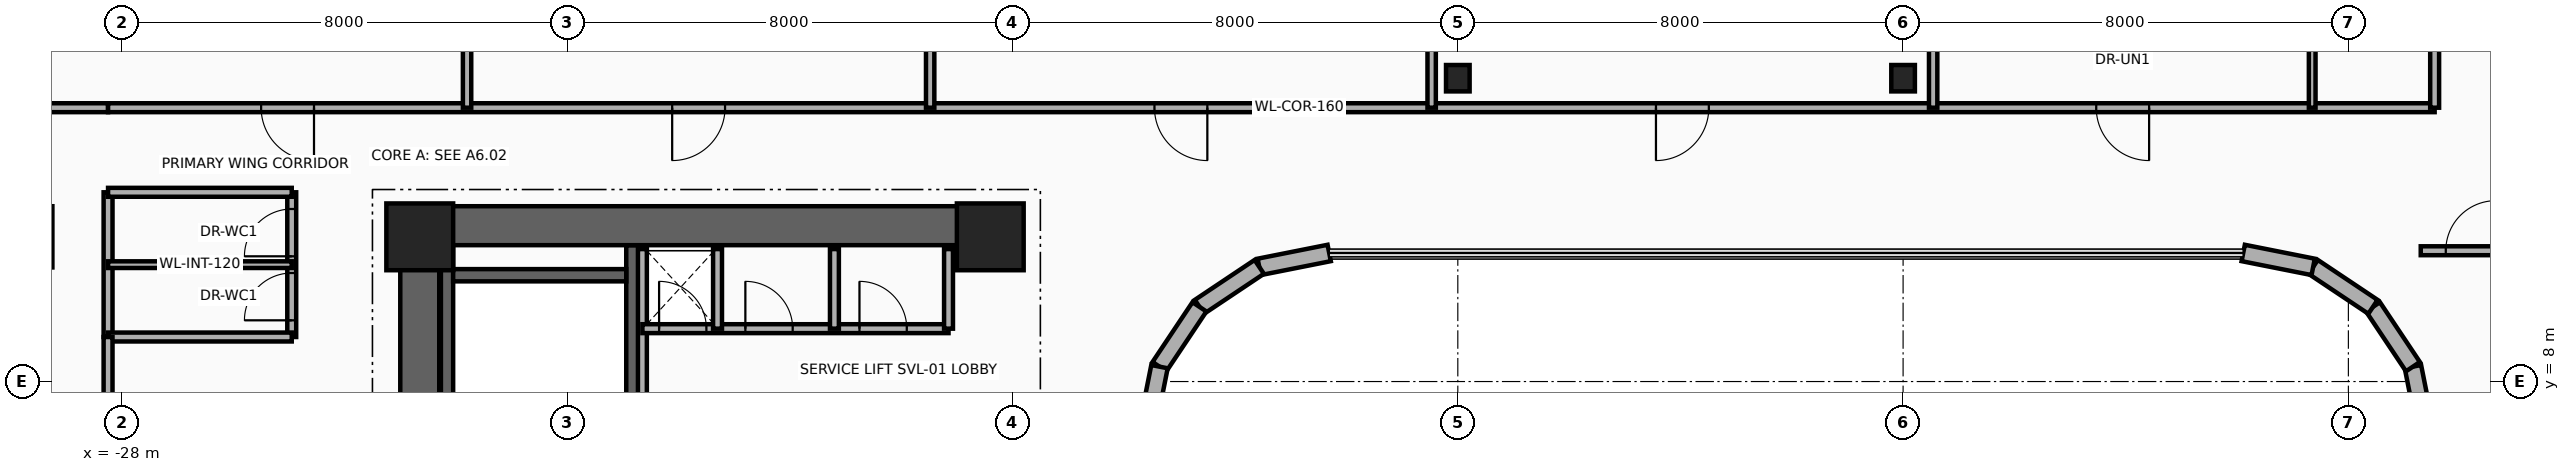
"""IFC4 building model, lengths in metres.
Left out: names, types, materials, properties, quantities, classifications, styles, units other than length and angle.
Written with IfcOpenShell. Run it as: python <this file> out.ifc"""

import sys

from ifc_helpers import new_model, si_unit, direction, frame, frame_2d, origin, origin_2d, place, context, subcontext, project, spatial, rectangle, i_section, extrude, source, transform, mapped, element, fill, save


model = new_model("IFC4")
c1 = context("Model", 3, precision=1e-05, world=origin(), true_north=direction((0.0, 1.0)))
c2 = subcontext(c1, "Body", "Model", "MODEL_VIEW")
j1 = project(units=[si_unit("LENGTHUNIT", "METRE"), si_unit("PLANEANGLEUNIT", "RADIAN")], contexts=[c1])
p1 = place(None, origin())
s1 = spatial("IfcSite", under=j1, at=p1, CompositionType="ELEMENT")
p2 = place(p1, origin())
s2 = spatial("IfcBuilding", under=s1, at=p2, CompositionType="ELEMENT")
p3 = place(p2, frame((0.0, 0.0, 116.8)))
s3 = spatial("IfcBuildingStorey", under=s2, at=p3, CompositionType="ELEMENT", Elevation=116.8)
for number, where, z_axis, x_axis in (
    (1, (-22.16, 1.78, 0.0), (0.0, 0.0, 1.0), (0.0, 1.0, 0.0)),
    (2, (-18.83, 1.78, 0.0), (0.0, 0.0, 1.0), (0.0, 1.0, 0.0)),
):
    element("IfcWall", number, at=place(p3, frame(where, z_axis=z_axis, x_axis=x_axis)), inside=s3, PredefinedType="SHEAR", context=c2, shape_type="SweptSolid", body=[
        extrude(rectangle(XDim=8.67, YDim=0.22, at=frame_2d((4.335, 0.0))), origin(), (0.0, 0.0, 1.0), 3.46),
    ])
p4 = place(p3, frame((-22.05, 9.91, 0.0), z_axis=(0.0, 0.0, 1.0), x_axis=(1.0, 0.0, 0.0)))
e3 = element("IfcWall", 3, at=p4, inside=s3, PredefinedType="SHEAR", context=c2, shape_type="SweptSolid", body=[
    extrude(rectangle(XDim=3.11, YDim=0.22, at=frame_2d((1.555, 0.0))), origin(), (0.0, 0.0, 1.0), 3.46),
])
p5 = place(p3, frame((-22.65, -11.15, 0.0), z_axis=(0.0, 0.0, 1.0), x_axis=(0.0, 1.0, 0.0)))
e4 = element("IfcWall", 4, at=p5, inside=s3, PredefinedType="SHEAR", context=c2, shape_type="SweptSolid", body=[
    extrude(rectangle(XDim=22.3, YDim=0.7, at=frame_2d((11.15, 0.0))), origin(), (0.0, 0.0, 1.0), 3.46),
])
p6 = place(p3, frame((-22.65, 10.8, 0.0), z_axis=(0.0, 0.0, 1.0), x_axis=(1.0, 0.0, 0.0)))
e5 = element("IfcWall", 5, at=p6, inside=s3, PredefinedType="SHEAR", context=c2, shape_type="SweptSolid", body=[
    extrude(rectangle(XDim=10.25, YDim=0.7, at=frame_2d((5.125, 0.0))), origin(), (0.0, 0.0, 1.0), 3.46),
])
m1 = source(origin(), c2, "Body", "SweptSolid", [
    extrude(rectangle(XDim=1.2, YDim=1.2, at=origin_2d()), origin(), (0.0, 0.0, 1.0), 3.7),
])
for number, where, z_axis, x_axis in (
    (6, (-22.65, 10.6, 0.0), (0.0, 0.0, 1.0), (1.0, 0.0, 0.0)),
    (7, (-12.4, 10.6, 0.0), (0.0, 0.0, 1.0), (1.0, 0.0, 0.0)),
):
    element("IfcColumn", number, at=place(p3, frame(where, z_axis=z_axis, x_axis=x_axis)), inside=s3, PredefinedType="COLUMN", context=c2, shape_type="MappedRepresentation", body=[
        mapped(m1, transform((0.0, 0.0, 0.0), x_axis=(1.0, 0.0, 0.0), y_axis=(0.0, 1.0, 0.0), z_axis=(0.0, 0.0, 1.0), scale=1.0)),
    ])
m2 = source(origin(), c2, "Body", "SweptSolid", [
    extrude(i_section(OverallWidth=0.424, OverallDepth=0.474, WebThickness=0.048, FlangeThickness=0.077, at=origin_2d()), origin(), (0.0, 0.0, 1.0), 3.7),
])
for number, where, z_axis, x_axis in (
    (8, (-4.0, 13.45, 0.0), (0.0, 0.0, 1.0), (1.0, 0.0, 0.0)),
    (9, (4.0, 13.45, 0.0), (0.0, 0.0, 1.0), (1.0, 0.0, 0.0)),
):
    element("IfcColumn", number, at=place(p3, frame(where, z_axis=z_axis, x_axis=x_axis)), inside=s3, PredefinedType="COLUMN", context=c2, shape_type="MappedRepresentation", body=[
        mapped(m2, transform((0.0, 0.0, 0.0), x_axis=(1.0, 0.0, 0.0), y_axis=(0.0, 1.0, 0.0), z_axis=(0.0, 0.0, 1.0), scale=1.0)),
    ])
p7 = place(p3, frame((13.41, 7.011, 0.0), z_axis=(0.0, 0.0, 1.0), x_axis=(-0.195090163074, 0.980785312019, 0.0)))
e10 = element("IfcWall", 10, at=p7, inside=s3, PredefinedType="SOLIDWALL", context=c2, shape_type="SweptSolid", body=[
    extrude(rectangle(XDim=1.281, YDim=0.3, at=frame_2d((0.641, 0.0))), origin(), (0.0, 0.0, 1.0), 3.46),
])
for number, where, z_axis, x_axis in (
    (11, (13.16, 8.268, 0.0), (0.0, 0.0, 1.0), (-0.556, 0.831, 0.0)),
    (12, (12.442, 9.342, 0.0), (0.0, 0.0, 1.0), (-0.831, 0.556, 0.0)),
):
    element("IfcWall", number, at=place(p3, frame(where, z_axis=z_axis, x_axis=x_axis)), inside=s3, PredefinedType="SOLIDWALL", context=c2, shape_type="SweptSolid", body=[
        extrude(rectangle(XDim=1.292, YDim=0.3, at=frame_2d((0.646, 0.0))), origin(), (0.0, 0.0, 1.0), 3.46),
    ])
for number, where, z_axis, x_axis in (
    (13, (11.367, 10.06, 0.0), (0.0, 0.0, 1.0), (-0.981, 0.195, 0.0)),
    (14, (-6.311, 10.31, 0.0), (0.0, 0.0, 1.0), (-0.981, -0.195, 0.0)),
):
    element("IfcWall", number, at=place(p3, frame(where, z_axis=z_axis, x_axis=x_axis)), inside=s3, PredefinedType="SOLIDWALL", context=c2, shape_type="SweptSolid", body=[
        extrude(rectangle(XDim=1.281, YDim=0.3, at=frame_2d((0.641, 0.0))), origin(), (0.0, 0.0, 1.0), 3.46),
    ])
p8 = place(p3, frame((-7.567, 10.06, 0.0), z_axis=(0.0, 0.0, 1.0), x_axis=(-0.831497739511, -0.555528135371, 0.0)))
e15 = element("IfcWall", 15, at=p8, inside=s3, PredefinedType="SOLIDWALL", context=c2, shape_type="SweptSolid", body=[
    extrude(rectangle(XDim=1.292, YDim=0.3, at=frame_2d((0.646, 0.0))), origin(), (0.0, 0.0, 1.0), 3.46),
])
p9 = place(p3, frame((-8.642, 9.342, 0.0), z_axis=(0.0, 0.0, 1.0), x_axis=(-0.555615398575, -0.831439431869, 0.0)))
e16 = element("IfcWall", 16, at=p9, inside=s3, PredefinedType="SOLIDWALL", context=c2, shape_type="SweptSolid", body=[
    extrude(rectangle(XDim=1.292, YDim=0.3, at=frame_2d((0.646, 0.0))), origin(), (0.0, 0.0, 1.0), 3.46),
])
p10 = place(p3, frame((-9.36, 8.268, 0.0), z_axis=(0.0, 0.0, 1.0), x_axis=(-0.195090163074, -0.980785312019, 0.0)))
e17 = element("IfcWall", 17, at=p10, inside=s3, PredefinedType="SOLIDWALL", context=c2, shape_type="SweptSolid", body=[
    extrude(rectangle(XDim=1.281, YDim=0.3, at=frame_2d((0.641, 0.0))), origin(), (0.0, 0.0, 1.0), 3.46),
])
p11 = place(p3, frame((-18.65, 7.45, 0.0), z_axis=(0.0, 0.0, 1.0), x_axis=(0.0, 1.0, 0.0)))
e18 = element("IfcWall", 18, at=p11, inside=s3, PredefinedType="PARTITIONING", context=c2, shape_type="SweptSolid", body=[
    extrude(rectangle(XDim=2.93, YDim=0.16, at=frame_2d((1.465, 0.0))), origin(), (0.0, 0.0, 1.0), 3.46),
])
p12 = place(p3, frame((-18.65, 8.95, 0.0), z_axis=(0.0, 0.0, 1.0), x_axis=(1.0, 0.0, 0.0)))
e19 = element("IfcWall", 19, at=p12, inside=s3, PredefinedType="PARTITIONING", context=c2, shape_type="SweptSolid", body=[
    extrude(rectangle(XDim=5.5, YDim=0.16, at=frame_2d((2.75, 0.0))), origin(), (0.0, 0.0, 1.0), 3.46),
])
p13 = place(p12, frame((0.3, 0.0, 0.0)))
e20 = element("IfcOpeningElement", 20, at=p13, cuts=e19, PredefinedType="OPENING", context=c2, shape_type="SweptSolid", body=[
    extrude(rectangle(XDim=0.85, YDim=2.05, at=frame_2d((0.425, 1.025))), frame((0.0, 0.095, 0.0), z_axis=(0.0, -1.0, 0.0), x_axis=(1.0, 0.0, 0.0)), (0.0, 0.0, 1.0), 0.19),
])
p14 = place(p12, frame((1.85, 0.0, 0.0)))
e21 = element("IfcOpeningElement", 21, at=p14, cuts=e19, PredefinedType="OPENING", context=c2, shape_type="SweptSolid", body=[
    extrude(rectangle(XDim=0.85, YDim=2.05, at=frame_2d((0.425, 1.025))), frame((0.0, 0.095, 0.0), z_axis=(0.0, -1.0, 0.0), x_axis=(1.0, 0.0, 0.0)), (0.0, 0.0, 1.0), 0.19),
])
p15 = place(p12, frame((3.9, 0.0, 0.0)))
e22 = element("IfcOpeningElement", 22, at=p15, cuts=e19, PredefinedType="OPENING", context=c2, shape_type="SweptSolid", body=[
    extrude(rectangle(XDim=0.85, YDim=2.05, at=frame_2d((0.425, 1.025))), frame((0.0, 0.095, 0.0), z_axis=(0.0, -1.0, 0.0), x_axis=(1.0, 0.0, 0.0)), (0.0, 0.0, 1.0), 0.19),
])
for number, where, z_axis, x_axis in (
    (23, (-13.15, 8.95, 0.0), (0.0, 0.0, 1.0), (0.0, 1.0, 0.0)),
    (24, (-17.3, 8.95, 0.0), (0.0, 0.0, 1.0), (0.0, 1.0, 0.0)),
    (25, (-15.2, 8.95, 0.0), (0.0, 0.0, 1.0), (0.0, 1.0, 0.0)),
):
    element("IfcWall", number, at=place(p3, frame(where, z_axis=z_axis, x_axis=x_axis)), inside=s3, PredefinedType="PARTITIONING", context=c2, shape_type="SweptSolid", body=[
        extrude(rectangle(XDim=1.43, YDim=0.16, at=frame_2d((0.715, 0.0))), origin(), (0.0, 0.0, 1.0), 3.46),
    ])
p16 = place(p3, frame((-28.25, 8.8, 0.0), z_axis=(0.0, 0.0, 1.0), x_axis=(0.0, 1.0, 0.0)))
e26 = element("IfcWall", 26, at=p16, inside=s3, PredefinedType="PARTITIONING", context=c2, shape_type="SweptSolid", body=[
    extrude(rectangle(XDim=2.6, YDim=0.16, at=frame_2d((1.3, 0.0))), origin(), (0.0, 0.0, 1.0), 2.666),
])
p17 = place(p3, frame((-24.95, 8.8, 0.0), z_axis=(0.0, 0.0, 1.0), x_axis=(0.0, 1.0, 0.0)))
e27 = element("IfcWall", 27, at=p17, inside=s3, PredefinedType="PARTITIONING", context=c2, shape_type="SweptSolid", body=[
    extrude(rectangle(XDim=2.6, YDim=0.16, at=frame_2d((1.3, 0.0))), origin(), (0.0, 0.0, 1.0), 2.666),
])
p18 = place(p17, frame((0.3, 0.0, 0.0)))
e28 = element("IfcOpeningElement", 28, at=p18, cuts=e27, PredefinedType="OPENING", context=c2, shape_type="SweptSolid", body=[
    extrude(rectangle(XDim=0.85, YDim=2.1, at=frame_2d((0.425, 1.05))), frame((0.0, 0.095, 0.0), z_axis=(0.0, -1.0, 0.0), x_axis=(1.0, 0.0, 0.0)), (0.0, 0.0, 1.0), 0.19),
])
p19 = place(p17, frame((1.45, 0.0, 0.0)))
e29 = element("IfcOpeningElement", 29, at=p19, cuts=e27, PredefinedType="OPENING", context=c2, shape_type="SweptSolid", body=[
    extrude(rectangle(XDim=0.85, YDim=2.1, at=frame_2d((0.425, 1.05))), frame((0.0, 0.095, 0.0), z_axis=(0.0, -1.0, 0.0), x_axis=(1.0, 0.0, 0.0)), (0.0, 0.0, 1.0), 0.19),
])
for number, where, z_axis, x_axis in (
    (30, (-28.25, 8.8, 0.0), (0.0, 0.0, 1.0), (1.0, 0.0, 0.0)),
    (31, (-28.25, 11.4, 0.0), (0.0, 0.0, 1.0), (1.0, 0.0, 0.0)),
):
    element("IfcWall", number, at=place(p3, frame(where, z_axis=z_axis, x_axis=x_axis)), inside=s3, PredefinedType="PARTITIONING", context=c2, shape_type="SweptSolid", body=[
        extrude(rectangle(XDim=3.3, YDim=0.16, at=frame_2d((1.65, 0.0))), origin(), (0.0, 0.0, 1.0), 3.46),
    ])
p20 = place(p3, frame((-28.25, 10.1, 0.0), z_axis=(0.0, 0.0, 1.0), x_axis=(1.0, 0.0, 0.0)))
e32 = element("IfcWall", 32, at=p20, inside=s3, PredefinedType="PARTITIONING", context=c2, shape_type="SweptSolid", body=[
    extrude(rectangle(XDim=3.3, YDim=0.12, at=frame_2d((1.65, 0.0))), origin(), (0.0, 0.0, 1.0), 3.46),
])
p21 = place(p3, frame((-28.25, 5.8, 0.0), z_axis=(0.0, 0.0, 1.0), x_axis=(0.0, 1.0, 0.0)))
e33 = element("IfcWall", 33, at=p21, inside=s3, PredefinedType="PARTITIONING", context=c2, shape_type="SweptSolid", body=[
    extrude(rectangle(XDim=3.0, YDim=0.16, at=frame_2d((1.5, 0.0))), origin(), (0.0, 0.0, 1.0), 2.988),
])
p22 = place(p3, frame((-32.54, 12.92, 0.0), z_axis=(0.0, 0.0, 1.0), x_axis=(1.0, 0.0, 0.0)))
e34 = element("IfcWall", 34, at=p22, inside=s3, PredefinedType="PARTITIONING", context=c2, shape_type="SweptSolid", body=[
    extrude(rectangle(XDim=4.29, YDim=0.16, at=frame_2d((2.145, 0.0))), origin(), (0.0, 0.0, 1.0), 2.896),
])
p23 = place(p3, frame((-28.25, 12.92, 0.0), z_axis=(0.0, 0.0, 1.0), x_axis=(1.0, 0.0, 0.0)))
e35 = element("IfcWall", 35, at=p23, inside=s3, PredefinedType="PARTITIONING", context=c2, shape_type="SweptSolid", body=[
    extrude(rectangle(XDim=41.8, YDim=0.16, at=frame_2d((20.9, 0.0))), origin(), (0.0, 0.0, 1.0), 2.666),
])
p24 = place(p23, frame((2.75, 0.0, 0.0)))
e36 = element("IfcOpeningElement", 36, at=p24, cuts=e35, PredefinedType="OPENING", context=c2, shape_type="SweptSolid", body=[
    extrude(rectangle(XDim=0.95, YDim=2.15, at=frame_2d((0.475, 1.075))), frame((0.0, 0.095, 0.0), z_axis=(0.0, -1.0, 0.0), x_axis=(1.0, 0.0, 0.0)), (0.0, 0.0, 1.0), 0.19),
])
p25 = place(p23, frame((10.135, 0.0, 0.0)))
e37 = element("IfcOpeningElement", 37, at=p25, cuts=e35, PredefinedType="OPENING", context=c2, shape_type="SweptSolid", body=[
    extrude(rectangle(XDim=0.95, YDim=2.15, at=frame_2d((0.475, 1.075))), frame((0.0, 0.095, 0.0), z_axis=(0.0, -1.0, 0.0), x_axis=(1.0, 0.0, 0.0)), (0.0, 0.0, 1.0), 0.19),
])
p26 = place(p23, frame((18.8, 0.0, 0.0)))
e38 = element("IfcOpeningElement", 38, at=p26, cuts=e35, PredefinedType="OPENING", context=c2, shape_type="SweptSolid", body=[
    extrude(rectangle(XDim=0.95, YDim=2.15, at=frame_2d((0.475, 1.075))), frame((0.0, 0.095, 0.0), z_axis=(0.0, -1.0, 0.0), x_axis=(1.0, 0.0, 0.0)), (0.0, 0.0, 1.0), 0.19),
])
p27 = place(p23, frame((27.81, 0.0, 0.0)))
e39 = element("IfcOpeningElement", 39, at=p27, cuts=e35, PredefinedType="OPENING", context=c2, shape_type="SweptSolid", body=[
    extrude(rectangle(XDim=0.95, YDim=2.15, at=frame_2d((0.475, 1.075))), frame((0.0, 0.095, 0.0), z_axis=(0.0, -1.0, 0.0), x_axis=(1.0, 0.0, 0.0)), (0.0, 0.0, 1.0), 0.19),
])
p28 = place(p23, frame((35.72, 0.0, 0.0)))
e40 = element("IfcOpeningElement", 40, at=p28, cuts=e35, PredefinedType="OPENING", context=c2, shape_type="SweptSolid", body=[
    extrude(rectangle(XDim=0.95, YDim=2.15, at=frame_2d((0.475, 1.075))), frame((0.0, 0.095, 0.0), z_axis=(0.0, -1.0, 0.0), x_axis=(1.0, 0.0, 0.0)), (0.0, 0.0, 1.0), 0.19),
])
p29 = place(p3, frame((13.55, 12.92, 0.0), z_axis=(0.0, 0.0, 1.0), x_axis=(0.0, 1.0, 0.0)))
e41 = element("IfcWall", 41, at=p29, inside=s3, PredefinedType="PARTITIONING", context=c2, shape_type="SweptSolid", body=[
    extrude(rectangle(XDim=5.857, YDim=0.16, at=frame_2d((2.928, 0.0))), origin(), (0.0, 0.0, 1.0), 2.666),
])
p30 = place(p3, frame((-21.8, 12.92, 0.0), z_axis=(0.0, 0.0, 1.0), x_axis=(0.0, 1.0, 0.0)))
e42 = element("IfcWall", 42, at=p30, inside=s3, PredefinedType="PARTITIONING", context=c2, shape_type="SweptSolid", body=[
    extrude(rectangle(XDim=6.552, YDim=0.15, at=frame_2d((3.276, 0.0))), origin(), (0.0, 0.0, 1.0), 2.666),
])
p31 = place(p3, frame((-13.48, 12.92, 0.0), z_axis=(0.0, 0.0, 1.0), x_axis=(0.0, 1.0, 0.0)))
e43 = element("IfcWall", 43, at=p31, inside=s3, PredefinedType="PARTITIONING", context=c2, shape_type="SweptSolid", body=[
    extrude(rectangle(XDim=7.259, YDim=0.15, at=frame_2d((3.629, 0.0))), origin(), (0.0, 0.0, 1.0), 2.666),
])
p32 = place(p3, frame((-4.47, 12.92, 0.0), z_axis=(0.0, 0.0, 1.0), x_axis=(0.0, 1.0, 0.0)))
e44 = element("IfcWall", 44, at=p32, inside=s3, PredefinedType="PARTITIONING", context=c2, shape_type="SweptSolid", body=[
    extrude(rectangle(XDim=7.173, YDim=0.15, at=frame_2d((3.586, 0.0))), origin(), (0.0, 0.0, 1.0), 2.666),
])
p33 = place(p3, frame((4.54, 12.92, 0.0), z_axis=(0.0, 0.0, 1.0), x_axis=(0.0, 1.0, 0.0)))
e45 = element("IfcWall", 45, at=p33, inside=s3, PredefinedType="PARTITIONING", context=c2, shape_type="SweptSolid", body=[
    extrude(rectangle(XDim=6.764, YDim=0.15, at=frame_2d((3.382, 0.0))), origin(), (0.0, 0.0, 1.0), 2.666),
])
p34 = place(p3, frame((11.35, 12.92, 0.0), z_axis=(0.0, 0.0, 1.0), x_axis=(0.0, 1.0, 0.0)))
e46 = element("IfcWall", 46, at=p34, inside=s3, PredefinedType="PARTITIONING", context=c2, shape_type="SweptSolid", body=[
    extrude(rectangle(XDim=2.0, YDim=0.12, at=frame_2d((1.0, 0.0))), origin(), (0.0, 0.0, 1.0), 2.666),
])
p35 = place(p3, frame((13.3, 10.35, 0.0), z_axis=(0.0, 0.0, 1.0), x_axis=(1.0, 0.0, 0.0)))
e47 = element("IfcWall", 47, at=p35, inside=s3, PredefinedType="PARTITIONING", context=c2, shape_type="SweptSolid", body=[
    extrude(rectangle(XDim=2.1, YDim=0.16, at=frame_2d((1.05, 0.0))), origin(), (0.0, 0.0, 1.0), 2.666),
])
p36 = place(p35, frame((0.45, 0.0, 0.0)))
e48 = element("IfcOpeningElement", 48, at=p36, cuts=e47, PredefinedType="OPENING", context=c2, shape_type="SweptSolid", body=[
    extrude(rectangle(XDim=0.9, YDim=2.1, at=frame_2d((0.45, 1.05))), frame((0.0, 0.095, 0.0), z_axis=(0.0, -1.0, 0.0), x_axis=(1.0, 0.0, 0.0)), (0.0, 0.0, 1.0), 0.19),
])
p37 = place(p13, origin())
e49 = element("IfcDoor", 49, at=p37, inside=s3, OperationType="SINGLE_SWING_LEFT", PredefinedType="DOOR", context=c2, shape_type="SweptSolid", body=[
    extrude(rectangle(XDim=0.85, YDim=2.05, at=frame_2d((0.425, 1.025))), frame((0.0, 0.025, 0.0), z_axis=(0.0, -1.0, 0.0), x_axis=(1.0, 0.0, 0.0)), (0.0, 0.0, 1.0), 0.05),
])
fill(e20, e49)
p38 = place(p14, origin())
e50 = element("IfcDoor", 50, at=p38, inside=s3, OperationType="SINGLE_SWING_RIGHT", PredefinedType="DOOR", context=c2, shape_type="SweptSolid", body=[
    extrude(rectangle(XDim=0.85, YDim=2.05, at=frame_2d((0.425, 1.025))), frame((0.0, 0.025, 0.0), z_axis=(0.0, -1.0, 0.0), x_axis=(1.0, 0.0, 0.0)), (0.0, 0.0, 1.0), 0.05),
])
fill(e21, e50)
p39 = place(p15, origin())
e51 = element("IfcDoor", 51, at=p39, inside=s3, OperationType="SINGLE_SWING_LEFT", PredefinedType="DOOR", context=c2, shape_type="SweptSolid", body=[
    extrude(rectangle(XDim=0.85, YDim=2.05, at=frame_2d((0.425, 1.025))), frame((0.0, 0.025, 0.0), z_axis=(0.0, -1.0, 0.0), x_axis=(1.0, 0.0, 0.0)), (0.0, 0.0, 1.0), 0.05),
])
fill(e22, e51)
p40 = place(p18, origin())
e52 = element("IfcDoor", 52, at=p40, inside=s3, OperationType="SINGLE_SWING_LEFT", PredefinedType="DOOR", context=c2, shape_type="SweptSolid", body=[
    extrude(rectangle(XDim=0.85, YDim=2.1, at=frame_2d((0.425, 1.05))), frame((0.0, 0.025, 0.0), z_axis=(0.0, -1.0, 0.0), x_axis=(1.0, 0.0, 0.0)), (0.0, 0.0, 1.0), 0.05),
])
fill(e28, e52)
p41 = place(p19, origin())
e53 = element("IfcDoor", 53, at=p41, inside=s3, OperationType="SINGLE_SWING_RIGHT", PredefinedType="DOOR", context=c2, shape_type="SweptSolid", body=[
    extrude(rectangle(XDim=0.85, YDim=2.1, at=frame_2d((0.425, 1.05))), frame((0.0, 0.025, 0.0), z_axis=(0.0, -1.0, 0.0), x_axis=(1.0, 0.0, 0.0)), (0.0, 0.0, 1.0), 0.05),
])
fill(e29, e53)
p42 = place(p24, frame((0.95, 0.0, 0.0), z_axis=(0.0, 0.0, 1.0), x_axis=(-1.0, 0.0, 0.0)))
e54 = element("IfcDoor", 54, at=p42, inside=s3, OperationType="SINGLE_SWING_LEFT", PredefinedType="DOOR", context=c2, shape_type="SweptSolid", body=[
    extrude(rectangle(XDim=0.95, YDim=2.15, at=frame_2d((0.475, 1.075))), frame((0.0, 0.025, 0.0), z_axis=(0.0, -1.0, 0.0), x_axis=(1.0, 0.0, 0.0)), (0.0, 0.0, 1.0), 0.05),
])
fill(e36, e54)
p43 = place(p25, frame((0.95, 0.0, 0.0), z_axis=(0.0, 0.0, 1.0), x_axis=(-1.0, 0.0, 0.0)))
e55 = element("IfcDoor", 55, at=p43, inside=s3, OperationType="SINGLE_SWING_LEFT", PredefinedType="DOOR", context=c2, shape_type="SweptSolid", body=[
    extrude(rectangle(XDim=0.95, YDim=2.15, at=frame_2d((0.475, 1.075))), frame((0.0, 0.025, 0.0), z_axis=(0.0, -1.0, 0.0), x_axis=(1.0, 0.0, 0.0)), (0.0, 0.0, 1.0), 0.05),
])
fill(e37, e55)
p44 = place(p26, frame((0.95, 0.0, 0.0), z_axis=(0.0, 0.0, 1.0), x_axis=(-1.0, 0.0, 0.0)))
e56 = element("IfcDoor", 56, at=p44, inside=s3, OperationType="SINGLE_SWING_LEFT", PredefinedType="DOOR", context=c2, shape_type="SweptSolid", body=[
    extrude(rectangle(XDim=0.95, YDim=2.15, at=frame_2d((0.475, 1.075))), frame((0.0, 0.025, 0.0), z_axis=(0.0, -1.0, 0.0), x_axis=(1.0, 0.0, 0.0)), (0.0, 0.0, 1.0), 0.05),
])
fill(e38, e56)
p45 = place(p27, frame((0.95, 0.0, 0.0), z_axis=(0.0, 0.0, 1.0), x_axis=(-1.0, 0.0, 0.0)))
e57 = element("IfcDoor", 57, at=p45, inside=s3, OperationType="SINGLE_SWING_LEFT", PredefinedType="DOOR", context=c2, shape_type="SweptSolid", body=[
    extrude(rectangle(XDim=0.95, YDim=2.15, at=frame_2d((0.475, 1.075))), frame((0.0, 0.025, 0.0), z_axis=(0.0, -1.0, 0.0), x_axis=(1.0, 0.0, 0.0)), (0.0, 0.0, 1.0), 0.05),
])
fill(e39, e57)
p46 = place(p28, frame((0.95, 0.0, 0.0), z_axis=(0.0, 0.0, 1.0), x_axis=(-1.0, 0.0, 0.0)))
e58 = element("IfcDoor", 58, at=p46, inside=s3, OperationType="SINGLE_SWING_LEFT", PredefinedType="DOOR", context=c2, shape_type="SweptSolid", body=[
    extrude(rectangle(XDim=0.95, YDim=2.15, at=frame_2d((0.475, 1.075))), frame((0.0, 0.025, 0.0), z_axis=(0.0, -1.0, 0.0), x_axis=(1.0, 0.0, 0.0)), (0.0, 0.0, 1.0), 0.05),
])
fill(e40, e58)
p47 = place(p36, origin())
e59 = element("IfcDoor", 59, at=p47, inside=s3, OperationType="SINGLE_SWING_LEFT", PredefinedType="DOOR", context=c2, shape_type="SweptSolid", body=[
    extrude(rectangle(XDim=0.9, YDim=2.1, at=frame_2d((0.45, 1.05))), frame((0.0, 0.025, 0.0), z_axis=(0.0, -1.0, 0.0), x_axis=(1.0, 0.0, 0.0)), (0.0, 0.0, 1.0), 0.05),
])
fill(e48, e59)
save(model, sys.argv[1])
